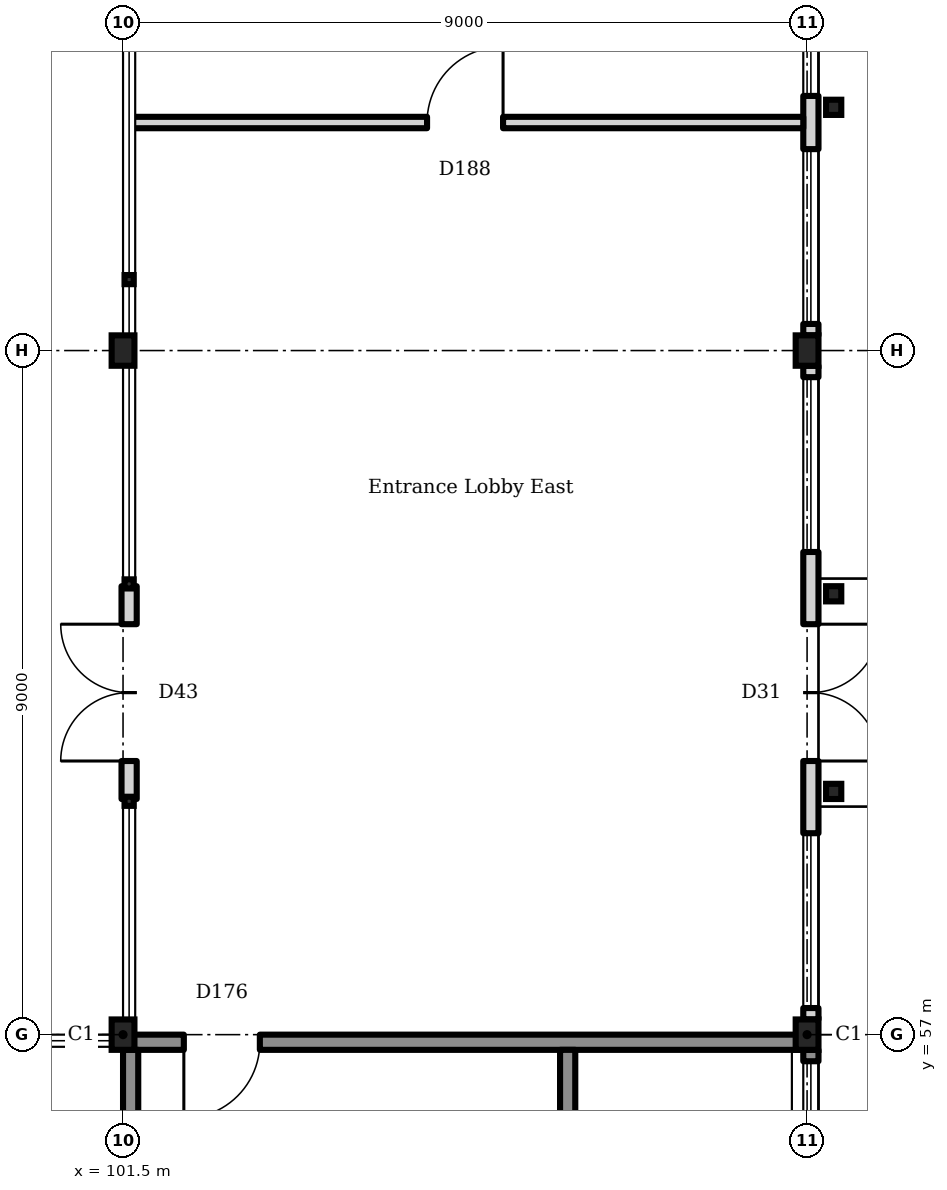
"""IFC4 building model, lengths in metres.
Left out: names, types, materials, properties, quantities, classifications, styles, units other than length and angle.
Written with IfcOpenShell. Run it as: python <this file> out.ifc"""

import sys

from ifc_helpers import new_model, si_unit, direction, frame, frame_2d, origin, origin_2d, place, context, subcontext, project, spatial, rectangle, hollow_rectangle, i_section, extrude, element, fill, save


model = new_model("IFC4")
c1 = context("Model", 3, precision=1e-05, world=origin(), true_north=direction((0.0, 1.0)))
c2 = subcontext(c1, "Body", "Model", "MODEL_VIEW")
j1 = project(units=[si_unit("LENGTHUNIT", "METRE"), si_unit("PLANEANGLEUNIT", "RADIAN")], contexts=[c1])
p1 = place(None, origin())
s1 = spatial("IfcSite", under=j1, at=p1, CompositionType="ELEMENT")
p2 = place(p1, origin())
s2 = spatial("IfcBuilding", under=s1, at=p2, CompositionType="ELEMENT")
p3 = place(p2, origin())
s3 = spatial("IfcBuildingStorey", under=s2, at=p3, CompositionType="ELEMENT", Elevation=0.0)
for number, where, z_axis, x_axis in (
    (1, (101.5, 57.0, 0.0), (0.0, 0.0, 1.0), (1.0, 0.0, 0.0)),
    (2, (110.5, 57.0, 0.0), (0.0, 0.0, 1.0), (1.0, 0.0, 0.0)),
    (3, (101.5, 66.0, 0.0), (0.0, 0.0, 1.0), (1.0, 0.0, 0.0)),
    (4, (110.5, 66.0, 0.0), (0.0, 0.0, 1.0), (1.0, 0.0, 0.0)),
):
    element("IfcColumn", number, at=place(p3, frame(where, z_axis=z_axis, x_axis=x_axis)), inside=s3, PredefinedType="COLUMN", context=c2, shape_type="SweptSolid", body=[
        extrude(i_section(OverallWidth=0.3, OverallDepth=0.4, WebThickness=0.013, FlangeThickness=0.024, FilletRadius=0.027, at=origin_2d()), origin(), (0.0, 0.0, 1.0), 5.4),
    ])
p4 = place(p3, frame((110.55, 48.32, 0.0), z_axis=(0.0, 0.0, 1.0), x_axis=(0.0, 1.0, 0.0)))
e5 = element("IfcWall", 5, at=p4, inside=s3, PredefinedType="SOLIDWALL", context=c2, shape_type="SweptSolid", body=[
    extrude(rectangle(XDim=8.48, YDim=0.2, at=frame_2d((4.24, 0.0))), origin(), (0.0, 0.0, 1.0), 5.2),
])
p5 = place(p4, frame((3.03, 0.0, 0.9)))
e6 = element("IfcOpeningElement", 6, at=p5, cuts=e5, PredefinedType="OPENING", context=c2, shape_type="SweptSolid", body=[
    extrude(rectangle(XDim=2.3, YDim=3.6, at=frame_2d((1.15, 1.8))), frame((0.0, 0.11, 0.0), z_axis=(0.0, -1.0, 0.0), x_axis=(1.0, 0.0, 0.0)), (0.0, 0.0, 1.0), 0.22),
])
p6 = place(p4, frame((6.03, 0.0, 0.9)))
e7 = element("IfcOpeningElement", 7, at=p6, cuts=e5, PredefinedType="OPENING", context=c2, shape_type="SweptSolid", body=[
    extrude(rectangle(XDim=2.3, YDim=3.6, at=frame_2d((1.15, 1.8))), frame((0.0, 0.11, 0.0), z_axis=(0.0, -1.0, 0.0), x_axis=(1.0, 0.0, 0.0)), (0.0, 0.0, 1.0), 0.22),
])
p7 = place(p3, frame((110.55, 57.2, 0.0), z_axis=(0.0, 0.0, 1.0), x_axis=(0.0, 1.0, 0.0)))
e8 = element("IfcWall", 8, at=p7, inside=s3, PredefinedType="SOLIDWALL", context=c2, shape_type="SweptSolid", body=[
    extrude(rectangle(XDim=8.6, YDim=0.2, at=frame_2d((4.3, 0.0))), origin(), (0.0, 0.0, 1.0), 4.65),
])
p8 = place(p7, frame((3.4, 0.0, 0.0)))
e9 = element("IfcOpeningElement", 9, at=p8, cuts=e8, PredefinedType="OPENING", context=c2, shape_type="SweptSolid", body=[
    extrude(rectangle(XDim=1.8, YDim=2.1, at=frame_2d((0.9, 1.05))), frame((0.0, 0.11, 0.0), z_axis=(0.0, -1.0, 0.0), x_axis=(1.0, 0.0, 0.0)), (0.0, 0.0, 1.0), 0.22),
])
p9 = place(p7, frame((0.15, 0.0, 0.9)))
e10 = element("IfcOpeningElement", 10, at=p9, cuts=e8, PredefinedType="OPENING", context=c2, shape_type="SweptSolid", body=[
    extrude(rectangle(XDim=2.3, YDim=3.6, at=frame_2d((1.15, 1.8))), frame((0.0, 0.11, 0.0), z_axis=(0.0, -1.0, 0.0), x_axis=(1.0, 0.0, 0.0)), (0.0, 0.0, 1.0), 0.22),
])
p10 = place(p7, frame((6.15, 0.0, 0.9)))
e11 = element("IfcOpeningElement", 11, at=p10, cuts=e8, PredefinedType="OPENING", context=c2, shape_type="SweptSolid", body=[
    extrude(rectangle(XDim=2.3, YDim=3.6, at=frame_2d((1.15, 1.8))), frame((0.0, 0.11, 0.0), z_axis=(0.0, -1.0, 0.0), x_axis=(1.0, 0.0, 0.0)), (0.0, 0.0, 1.0), 0.22),
])
p11 = place(p3, frame((110.55, 66.2, 0.0), z_axis=(0.0, 0.0, 1.0), x_axis=(0.0, 1.0, 0.0)))
e12 = element("IfcWall", 12, at=p11, inside=s3, PredefinedType="SOLIDWALL", context=c2, shape_type="SweptSolid", body=[
    extrude(rectangle(XDim=8.584, YDim=0.2, at=frame_2d((4.292, 0.0))), origin(), (0.0, 0.0, 1.0), 4.65),
])
p12 = place(p11, frame((0.15, 0.0, 0.9)))
e13 = element("IfcOpeningElement", 13, at=p12, cuts=e12, PredefinedType="OPENING", context=c2, shape_type="SweptSolid", body=[
    extrude(rectangle(XDim=2.3, YDim=3.6, at=frame_2d((1.15, 1.8))), frame((0.0, 0.11, 0.0), z_axis=(0.0, -1.0, 0.0), x_axis=(1.0, 0.0, 0.0)), (0.0, 0.0, 1.0), 0.22),
])
p13 = place(p11, frame((3.15, 0.0, 0.9)))
e14 = element("IfcOpeningElement", 14, at=p13, cuts=e12, PredefinedType="OPENING", context=c2, shape_type="SweptSolid", body=[
    extrude(rectangle(XDim=2.3, YDim=3.6, at=frame_2d((1.15, 1.8))), frame((0.0, 0.11, 0.0), z_axis=(0.0, -1.0, 0.0), x_axis=(1.0, 0.0, 0.0)), (0.0, 0.0, 1.0), 0.22),
])
p14 = place(p11, frame((6.15, 0.0, 0.9)))
e15 = element("IfcOpeningElement", 15, at=p14, cuts=e12, PredefinedType="OPENING", context=c2, shape_type="SweptSolid", body=[
    extrude(rectangle(XDim=2.3, YDim=3.6, at=frame_2d((1.15, 1.8))), frame((0.0, 0.11, 0.0), z_axis=(0.0, -1.0, 0.0), x_axis=(1.0, 0.0, 0.0)), (0.0, 0.0, 1.0), 0.22),
])
p15 = place(p3, frame((101.58, 60.1, 0.0), z_axis=(0.0, 0.0, 1.0), x_axis=(0.0, 1.0, 0.0)))
e16 = element("IfcWall", 16, at=p15, inside=s3, PredefinedType="SOLIDWALL", context=c2, shape_type="SweptSolid", body=[
    extrude(rectangle(XDim=2.8, YDim=0.2, at=frame_2d((1.4, 0.0))), origin(), (0.0, 0.0, 1.0), 4.65),
])
p16 = place(p15, frame((0.5, 0.0, 0.0)))
e17 = element("IfcOpeningElement", 17, at=p16, cuts=e16, PredefinedType="OPENING", context=c2, shape_type="SweptSolid", body=[
    extrude(rectangle(XDim=1.8, YDim=2.1, at=frame_2d((0.9, 1.05))), frame((0.0, 0.11, 0.0), z_axis=(0.0, -1.0, 0.0), x_axis=(1.0, 0.0, 0.0)), (0.0, 0.0, 1.0), 0.22),
])
p17 = place(p3, frame((101.5, 56.9, 0.0), z_axis=(0.0, 0.0, 1.0), x_axis=(1.0, 0.0, 0.0)))
e18 = element("IfcWall", 18, at=p17, inside=s3, PredefinedType="SHEAR", context=c2, shape_type="SweptSolid", body=[
    extrude(rectangle(XDim=9.0, YDim=0.2, at=frame_2d((4.5, 0.0))), origin(), (0.0, 0.0, 1.0), 5.2),
])
p18 = place(p17, frame((0.8, 0.0, 0.0)))
e19 = element("IfcOpeningElement", 19, at=p18, cuts=e18, PredefinedType="OPENING", context=c2, shape_type="SweptSolid", body=[
    extrude(rectangle(XDim=1.0, YDim=2.1, at=frame_2d((0.5, 1.05))), frame((0.0, 0.11, 0.0), z_axis=(0.0, -1.0, 0.0), x_axis=(1.0, 0.0, 0.0)), (0.0, 0.0, 1.0), 0.22),
])
p19 = place(p3, frame((101.6, 48.15, 0.0), z_axis=(0.0, 0.0, 1.0), x_axis=(0.0, 1.0, 0.0)))
e20 = element("IfcWall", 20, at=p19, inside=s3, PredefinedType="SHEAR", context=c2, shape_type="SweptSolid", body=[
    extrude(rectangle(XDim=8.65, YDim=0.2, at=frame_2d((4.325, 0.0))), origin(), (0.0, 0.0, 1.0), 4.65),
])
p20 = place(p19, frame((3.85, 0.0, 0.0)))
e21 = element("IfcOpeningElement", 21, at=p20, cuts=e20, PredefinedType="OPENING", context=c2, shape_type="SweptSolid", body=[
    extrude(rectangle(XDim=1.0, YDim=2.1, at=frame_2d((0.5, 1.05))), frame((0.0, 0.11, 0.0), z_axis=(0.0, -1.0, 0.0), x_axis=(1.0, 0.0, 0.0)), (0.0, 0.0, 1.0), 0.22),
])
p21 = place(p3, frame((107.35, 48.15, 0.0), z_axis=(0.0, 0.0, 1.0), x_axis=(0.0, 1.0, 0.0)))
e22 = element("IfcWall", 22, at=p21, inside=s3, PredefinedType="SHEAR", context=c2, shape_type="SweptSolid", body=[
    extrude(rectangle(XDim=8.65, YDim=0.2, at=frame_2d((4.325, 0.0))), origin(), (0.0, 0.0, 1.0), 5.2),
])
p22 = place(p21, frame((0.35, 0.0, 0.0)))
e23 = element("IfcOpeningElement", 23, at=p22, cuts=e22, PredefinedType="OPENING", context=c2, shape_type="SweptSolid", body=[
    extrude(rectangle(XDim=1.0, YDim=2.1, at=frame_2d((0.5, 1.05))), frame((0.0, 0.11, 0.0), z_axis=(0.0, -1.0, 0.0), x_axis=(1.0, 0.0, 0.0)), (0.0, 0.0, 1.0), 0.22),
])
p23 = place(p3, frame((101.55, 69.0, 0.0), z_axis=(0.0, 0.0, 1.0), x_axis=(1.0, 0.0, 0.0)))
e24 = element("IfcWall", 24, at=p23, inside=s3, PredefinedType="PARTITIONING", context=c2, shape_type="SweptSolid", body=[
    extrude(rectangle(XDim=8.9, YDim=0.15, at=frame_2d((4.45, 0.0))), origin(), (0.0, 0.0, 1.0), 4.6),
])
p24 = place(p23, frame((3.95, 0.0, 0.0)))
e25 = element("IfcOpeningElement", 25, at=p24, cuts=e24, PredefinedType="OPENING", context=c2, shape_type="SweptSolid", body=[
    extrude(rectangle(XDim=1.0, YDim=2.1, at=frame_2d((0.5, 1.05))), frame((0.0, 0.085, 0.0), z_axis=(0.0, -1.0, 0.0), x_axis=(1.0, 0.0, 0.0)), (0.0, 0.0, 1.0), 0.17),
])
for number, where, z_axis, x_axis in (
    (26, (110.85, 60.2, 0.0), (0.0, 0.0, 1.0), (1.0, 0.0, 0.0)),
    (27, (110.85, 62.8, 0.0), (0.0, 0.0, 1.0), (1.0, 0.0, 0.0)),
    (28, (110.85, 69.2, 0.0), (0.0, 0.0, 1.0), (1.0, 0.0, 0.0)),
):
    element("IfcColumn", number, at=place(p3, frame(where, z_axis=z_axis, x_axis=x_axis)), inside=s3, PredefinedType="COLUMN", context=c2, shape_type="SweptSolid", body=[
        extrude(hollow_rectangle(XDim=0.2, YDim=0.2, WallThickness=0.01, InnerFilletRadius=0.01, OuterFilletRadius=0.015, at=origin_2d()), origin(), (0.0, 0.0, 1.0), 5.4),
    ])
p25 = place(p6, origin())
e29 = element("IfcWindow", 29, at=p25, inside=s3, PartitioningType="SINGLE_PANEL", PredefinedType="WINDOW", context=c2, shape_type="SweptSolid", body=[
    extrude(rectangle(XDim=2.3, YDim=3.6, at=frame_2d((1.15, 1.8))), frame((0.0, 0.03, 0.0), z_axis=(0.0, -1.0, 0.0), x_axis=(1.0, 0.0, 0.0)), (0.0, 0.0, 1.0), 0.06),
])
fill(e7, e29)
p26 = place(p8, frame((1.8, 0.0, 0.0), z_axis=(0.0, 0.0, 1.0), x_axis=(-1.0, 0.0, 0.0)))
e30 = element("IfcDoor", 30, at=p26, inside=s3, OperationType="DOUBLE_DOOR_SINGLE_SWING", PredefinedType="DOOR", context=c2, shape_type="SweptSolid", body=[
    extrude(rectangle(XDim=1.8, YDim=2.1, at=frame_2d((0.9, 1.05))), frame((0.0, 0.025, 0.0), z_axis=(0.0, -1.0, 0.0), x_axis=(1.0, 0.0, 0.0)), (0.0, 0.0, 1.0), 0.05),
])
fill(e9, e30)
p27 = place(p9, origin())
e31 = element("IfcWindow", 31, at=p27, inside=s3, PartitioningType="SINGLE_PANEL", PredefinedType="WINDOW", context=c2, shape_type="SweptSolid", body=[
    extrude(rectangle(XDim=2.3, YDim=3.6, at=frame_2d((1.15, 1.8))), frame((0.0, 0.03, 0.0), z_axis=(0.0, -1.0, 0.0), x_axis=(1.0, 0.0, 0.0)), (0.0, 0.0, 1.0), 0.06),
])
fill(e10, e31)
p28 = place(p10, origin())
e32 = element("IfcWindow", 32, at=p28, inside=s3, PartitioningType="SINGLE_PANEL", PredefinedType="WINDOW", context=c2, shape_type="SweptSolid", body=[
    extrude(rectangle(XDim=2.3, YDim=3.6, at=frame_2d((1.15, 1.8))), frame((0.0, 0.03, 0.0), z_axis=(0.0, -1.0, 0.0), x_axis=(1.0, 0.0, 0.0)), (0.0, 0.0, 1.0), 0.06),
])
fill(e11, e32)
p29 = place(p12, origin())
e33 = element("IfcWindow", 33, at=p29, inside=s3, PartitioningType="SINGLE_PANEL", PredefinedType="WINDOW", context=c2, shape_type="SweptSolid", body=[
    extrude(rectangle(XDim=2.3, YDim=3.6, at=frame_2d((1.15, 1.8))), frame((0.0, 0.03, 0.0), z_axis=(0.0, -1.0, 0.0), x_axis=(1.0, 0.0, 0.0)), (0.0, 0.0, 1.0), 0.06),
])
fill(e13, e33)
p30 = place(p13, origin())
e34 = element("IfcWindow", 34, at=p30, inside=s3, PartitioningType="SINGLE_PANEL", PredefinedType="WINDOW", context=c2, shape_type="SweptSolid", body=[
    extrude(rectangle(XDim=2.3, YDim=3.6, at=frame_2d((1.15, 1.8))), frame((0.0, 0.03, 0.0), z_axis=(0.0, -1.0, 0.0), x_axis=(1.0, 0.0, 0.0)), (0.0, 0.0, 1.0), 0.06),
])
fill(e14, e34)
p31 = place(p16, origin())
e35 = element("IfcDoor", 35, at=p31, inside=s3, OperationType="DOUBLE_DOOR_SINGLE_SWING", PredefinedType="DOOR", context=c2, shape_type="SweptSolid", body=[
    extrude(rectangle(XDim=1.8, YDim=2.1, at=frame_2d((0.9, 1.05))), frame((0.0, 0.025, 0.0), z_axis=(0.0, -1.0, 0.0), x_axis=(1.0, 0.0, 0.0)), (0.0, 0.0, 1.0), 0.05),
])
fill(e17, e35)
p32 = place(p18, frame((1.0, 0.0, 0.0), z_axis=(0.0, 0.0, 1.0), x_axis=(-1.0, 0.0, 0.0)))
e36 = element("IfcDoor", 36, at=p32, inside=s3, OperationType="SINGLE_SWING_LEFT", PredefinedType="DOOR", context=c2, shape_type="SweptSolid", body=[
    extrude(rectangle(XDim=1.0, YDim=2.1, at=frame_2d((0.5, 1.05))), frame((0.0, 0.025, 0.0), z_axis=(0.0, -1.0, 0.0), x_axis=(1.0, 0.0, 0.0)), (0.0, 0.0, 1.0), 0.05),
])
fill(e19, e36)
p33 = place(p24, origin())
e37 = element("IfcDoor", 37, at=p33, inside=s3, OperationType="SINGLE_SWING_LEFT", PredefinedType="DOOR", context=c2, shape_type="SweptSolid", body=[
    extrude(rectangle(XDim=1.0, YDim=2.1, at=frame_2d((0.5, 1.05))), frame((0.0, 0.025, 0.0), z_axis=(0.0, -1.0, 0.0), x_axis=(1.0, 0.0, 0.0)), (0.0, 0.0, 1.0), 0.05),
])
fill(e25, e37)
save(model, sys.argv[1])
